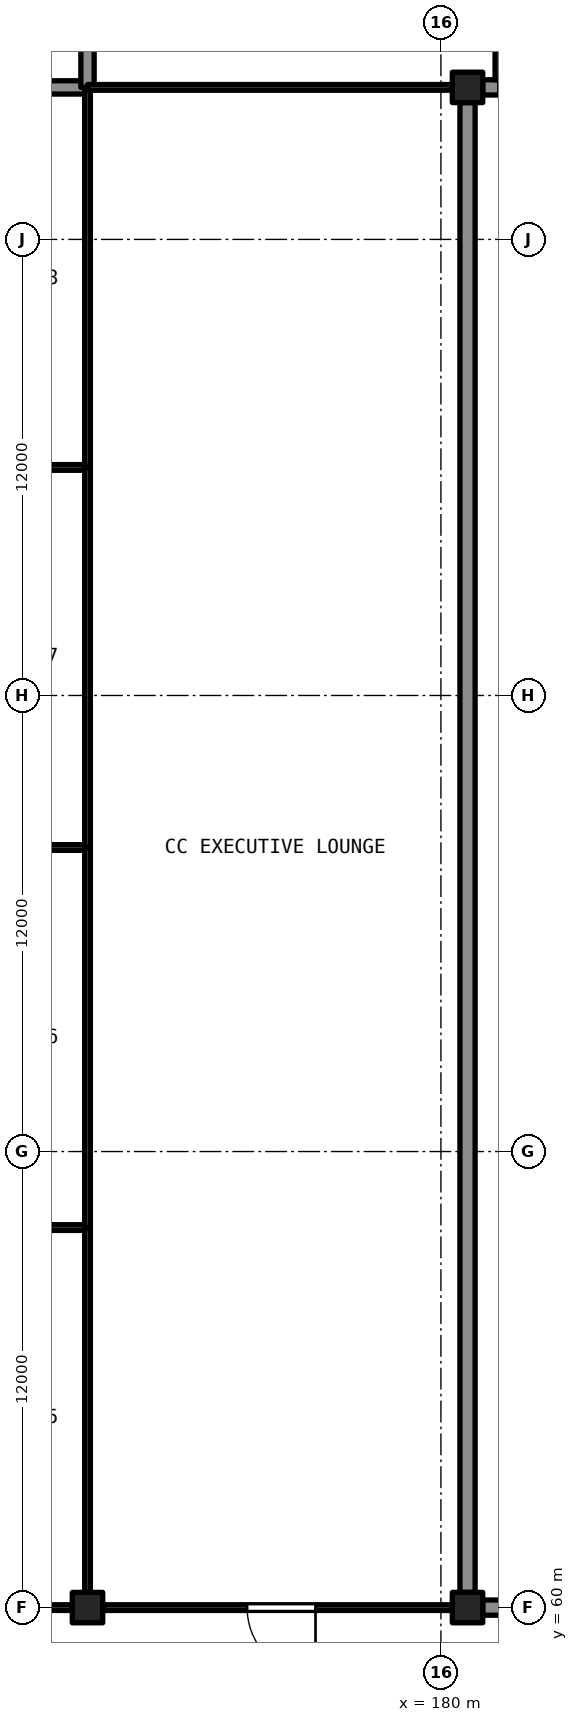
"""IFC4 building model, lengths in metres.
Left out: names, types, materials, properties, quantities, classifications, styles, units other than length and angle.
Written with IfcOpenShell. Run it as: python <this file> out.ifc"""

import sys

from ifc_helpers import new_model, si_unit, direction, frame, frame_2d, origin, origin_2d, place, context, subcontext, project, spatial, rectangle, extrude, element, fill, save


model = new_model("IFC4")
c1 = context("Model", 3, precision=1e-05, world=origin(), true_north=direction((0.0, 1.0)))
c2 = subcontext(c1, "Body", "Model", "MODEL_VIEW")
j1 = project(units=[si_unit("LENGTHUNIT", "METRE"), si_unit("PLANEANGLEUNIT", "RADIAN")], contexts=[c1])
p1 = place(None, origin())
s1 = spatial("IfcSite", under=j1, at=p1, CompositionType="ELEMENT")
p2 = place(p1, origin())
s2 = spatial("IfcBuilding", under=s1, at=p2, CompositionType="ELEMENT")
p3 = place(p2, frame((0.0, 0.0, 20.4)))
s3 = spatial("IfcBuildingStorey", under=s2, at=p3, CompositionType="ELEMENT", Elevation=20.4)
for number, where, z_axis, x_axis in (
    (1, (170.7, 60.0, 0.0), (0.0, 0.0, 1.0), (1.0, 0.0, 0.0)),
    (2, (180.7, 60.0, 0.0), (0.0, 0.0, 1.0), (1.0, 0.0, 0.0)),
    (3, (180.7, 100.0, 0.0), (0.0, 0.0, 1.0), (1.0, 0.0, 0.0)),
):
    element("IfcColumn", number, at=place(p3, frame(where, z_axis=z_axis, x_axis=x_axis)), inside=s3, PredefinedType="COLUMN", context=c2, shape_type="SweptSolid", body=[
        extrude(rectangle(XDim=0.8, YDim=0.8, at=origin_2d()), origin(), (0.0, 0.0, 1.0), 4.59),
    ])
p4 = place(p3, frame((180.7, 60.4, 0.0), z_axis=(0.0, 0.0, 1.0), x_axis=(0.0, 1.0, 0.0)))
e4 = element("IfcWall", 4, at=p4, inside=s3, PredefinedType="SHEAR", context=c2, shape_type="SweptSolid", body=[
    extrude(rectangle(XDim=39.2, YDim=0.4, at=frame_2d((19.6, 0.0))), origin(), (0.0, 0.0, 1.0), 4.59),
])
p5 = place(p3, frame((181.1, 60.0, 0.0), z_axis=(0.0, 0.0, 1.0), x_axis=(1.0, 0.0, 0.0)))
e5 = element("IfcWall", 5, at=p5, inside=s3, PredefinedType="SHEAR", context=c2, shape_type="SweptSolid", body=[
    extrude(rectangle(XDim=9.2, YDim=0.4, at=frame_2d((4.6, 0.0))), origin(), (0.0, 0.0, 1.0), 4.59),
])
p6 = place(p3, frame((181.1, 100.0, 0.0), z_axis=(0.0, 0.0, 1.0), x_axis=(1.0, 0.0, 0.0)))
e6 = element("IfcWall", 6, at=p6, inside=s3, PredefinedType="SHEAR", context=c2, shape_type="SweptSolid", body=[
    extrude(rectangle(XDim=0.45, YDim=0.4, at=frame_2d((0.225, 0.0))), origin(), (0.0, 0.0, 1.0), 4.59),
])
p7 = place(p3, frame((163.0, 100.0, 0.0), z_axis=(0.0, 0.0, 1.0), x_axis=(1.0, 0.0, 0.0)))
e7 = element("IfcWall", 7, at=p7, inside=s3, PredefinedType="SHEAR", context=c2, shape_type="SweptSolid", body=[
    extrude(rectangle(XDim=7.7, YDim=0.35, at=frame_2d((3.85, 0.0))), origin(), (0.0, 0.0, 1.0), 4.59),
])
p8 = place(p3, frame((170.7, 100.0, 0.0), z_axis=(0.0, 0.0, 1.0), x_axis=(0.0, 1.0, 0.0)))
e8 = element("IfcWall", 8, at=p8, inside=s3, PredefinedType="SHEAR", context=c2, shape_type="SweptSolid", body=[
    extrude(rectangle(XDim=3.15, YDim=0.35, at=frame_2d((1.575, 0.0))), origin(), (0.0, 0.0, 1.0), 4.59),
])
p9 = place(p3, frame((161.1, 60.0, 0.0), z_axis=(0.0, 0.0, 1.0), x_axis=(1.0, 0.0, 0.0)))
e9 = element("IfcWall", 9, at=p9, inside=s3, PredefinedType="PARTITIONING", context=c2, shape_type="SweptSolid", body=[
    extrude(rectangle(XDim=9.2, YDim=0.15, at=frame_2d((4.6, 0.0))), origin(), (0.0, 0.0, 1.0), 4.59),
])
p10 = place(p3, frame((180.3, 60.0, 0.0), z_axis=(0.0, 0.0, 1.0), x_axis=(-1.0, 0.0, 0.0)))
e10 = element("IfcWall", 10, at=p10, inside=s3, PredefinedType="PARTITIONING", context=c2, shape_type="SweptSolid", body=[
    extrude(rectangle(XDim=9.2, YDim=0.15, at=frame_2d((4.6, 0.0))), origin(), (0.0, 0.0, 1.0), 4.59),
])
p11 = place(p10, frame((3.6, 0.0, 0.0)))
e11 = element("IfcOpeningElement", 11, at=p11, cuts=e10, PredefinedType="OPENING", context=c2, shape_type="SweptSolid", body=[
    extrude(rectangle(XDim=1.8, YDim=2.1, at=frame_2d((0.9, 1.05))), frame((0.0, 0.085, 0.0), z_axis=(0.0, -1.0, 0.0), x_axis=(1.0, 0.0, 0.0)), (0.0, 0.0, 1.0), 0.171),
])
p12 = place(p3, frame((163.0, 70.0, 0.0), z_axis=(0.0, 0.0, 1.0), x_axis=(1.0, 0.0, 0.0)))
e12 = element("IfcWall", 12, at=p12, inside=s3, PredefinedType="PARTITIONING", context=c2, shape_type="SweptSolid", body=[
    extrude(rectangle(XDim=7.7, YDim=0.15, at=frame_2d((3.85, 0.0))), origin(), (0.0, 0.0, 1.0), 4.59),
])
p13 = place(p3, frame((170.7, 60.4, 0.0), z_axis=(0.0, 0.0, 1.0), x_axis=(0.0, 1.0, 0.0)))
e13 = element("IfcWall", 13, at=p13, inside=s3, PredefinedType="PARTITIONING", context=c2, shape_type="SweptSolid", body=[
    extrude(rectangle(XDim=9.6, YDim=0.15, at=frame_2d((4.8, 0.0))), origin(), (0.0, 0.0, 1.0), 4.59),
])
p14 = place(p3, frame((163.0, 80.0, 0.0), z_axis=(0.0, 0.0, 1.0), x_axis=(1.0, 0.0, 0.0)))
e14 = element("IfcWall", 14, at=p14, inside=s3, PredefinedType="PARTITIONING", context=c2, shape_type="SweptSolid", body=[
    extrude(rectangle(XDim=7.7, YDim=0.15, at=frame_2d((3.85, 0.0))), origin(), (0.0, 0.0, 1.0), 4.59),
])
p15 = place(p3, frame((170.7, 70.0, 0.0), z_axis=(0.0, 0.0, 1.0), x_axis=(0.0, 1.0, 0.0)))
e15 = element("IfcWall", 15, at=p15, inside=s3, PredefinedType="PARTITIONING", context=c2, shape_type="SweptSolid", body=[
    extrude(rectangle(XDim=10.0, YDim=0.15, at=frame_2d((5.0, 0.0))), origin(), (0.0, 0.0, 1.0), 4.59),
])
p16 = place(p3, frame((163.0, 90.0, 0.0), z_axis=(0.0, 0.0, 1.0), x_axis=(1.0, 0.0, 0.0)))
e16 = element("IfcWall", 16, at=p16, inside=s3, PredefinedType="PARTITIONING", context=c2, shape_type="SweptSolid", body=[
    extrude(rectangle(XDim=7.7, YDim=0.15, at=frame_2d((3.85, 0.0))), origin(), (0.0, 0.0, 1.0), 4.59),
])
for number, where, z_axis, x_axis in (
    (17, (170.7, 80.0, 0.0), (0.0, 0.0, 1.0), (0.0, 1.0, 0.0)),
    (18, (170.7, 90.0, 0.0), (0.0, 0.0, 1.0), (0.0, 1.0, 0.0)),
):
    element("IfcWall", number, at=place(p3, frame(where, z_axis=z_axis, x_axis=x_axis)), inside=s3, PredefinedType="PARTITIONING", context=c2, shape_type="SweptSolid", body=[
        extrude(rectangle(XDim=10.0, YDim=0.15, at=frame_2d((5.0, 0.0))), origin(), (0.0, 0.0, 1.0), 4.59),
    ])
p17 = place(p3, frame((170.7, 100.0, 0.0), z_axis=(0.0, 0.0, 1.0), x_axis=(1.0, 0.0, 0.0)))
e19 = element("IfcWall", 19, at=p17, inside=s3, PredefinedType="PARTITIONING", context=c2, shape_type="SweptSolid", body=[
    extrude(rectangle(XDim=9.6, YDim=0.15, at=frame_2d((4.8, 0.0))), origin(), (0.0, 0.0, 1.0), 4.59),
])
p18 = place(p3, frame((181.55, 100.2, 0.0), z_axis=(0.0, 0.0, 1.0), x_axis=(0.0, 1.0, 0.0)))
e20 = element("IfcWall", 20, at=p18, inside=s3, PredefinedType="SHEAR", context=c2, shape_type="SweptSolid", body=[
    extrude(rectangle(XDim=4.525, YDim=0.25, at=frame_2d((2.263, 0.0))), origin(), (0.0, 0.0, 1.0), 4.59),
])
p19 = place(p11, origin())
e21 = element("IfcDoor", 21, at=p19, inside=s3, OperationType="DOUBLE_DOOR_SINGLE_SWING", PredefinedType="DOOR", context=c2, shape_type="SweptSolid", body=[
    extrude(rectangle(XDim=1.8, YDim=2.1, at=frame_2d((0.9, 1.05))), frame((0.0, 0.025, 0.0), z_axis=(0.0, -1.0, 0.0), x_axis=(1.0, 0.0, 0.0)), (0.0, 0.0, 1.0), 0.05),
])
fill(e11, e21)
save(model, sys.argv[1])
